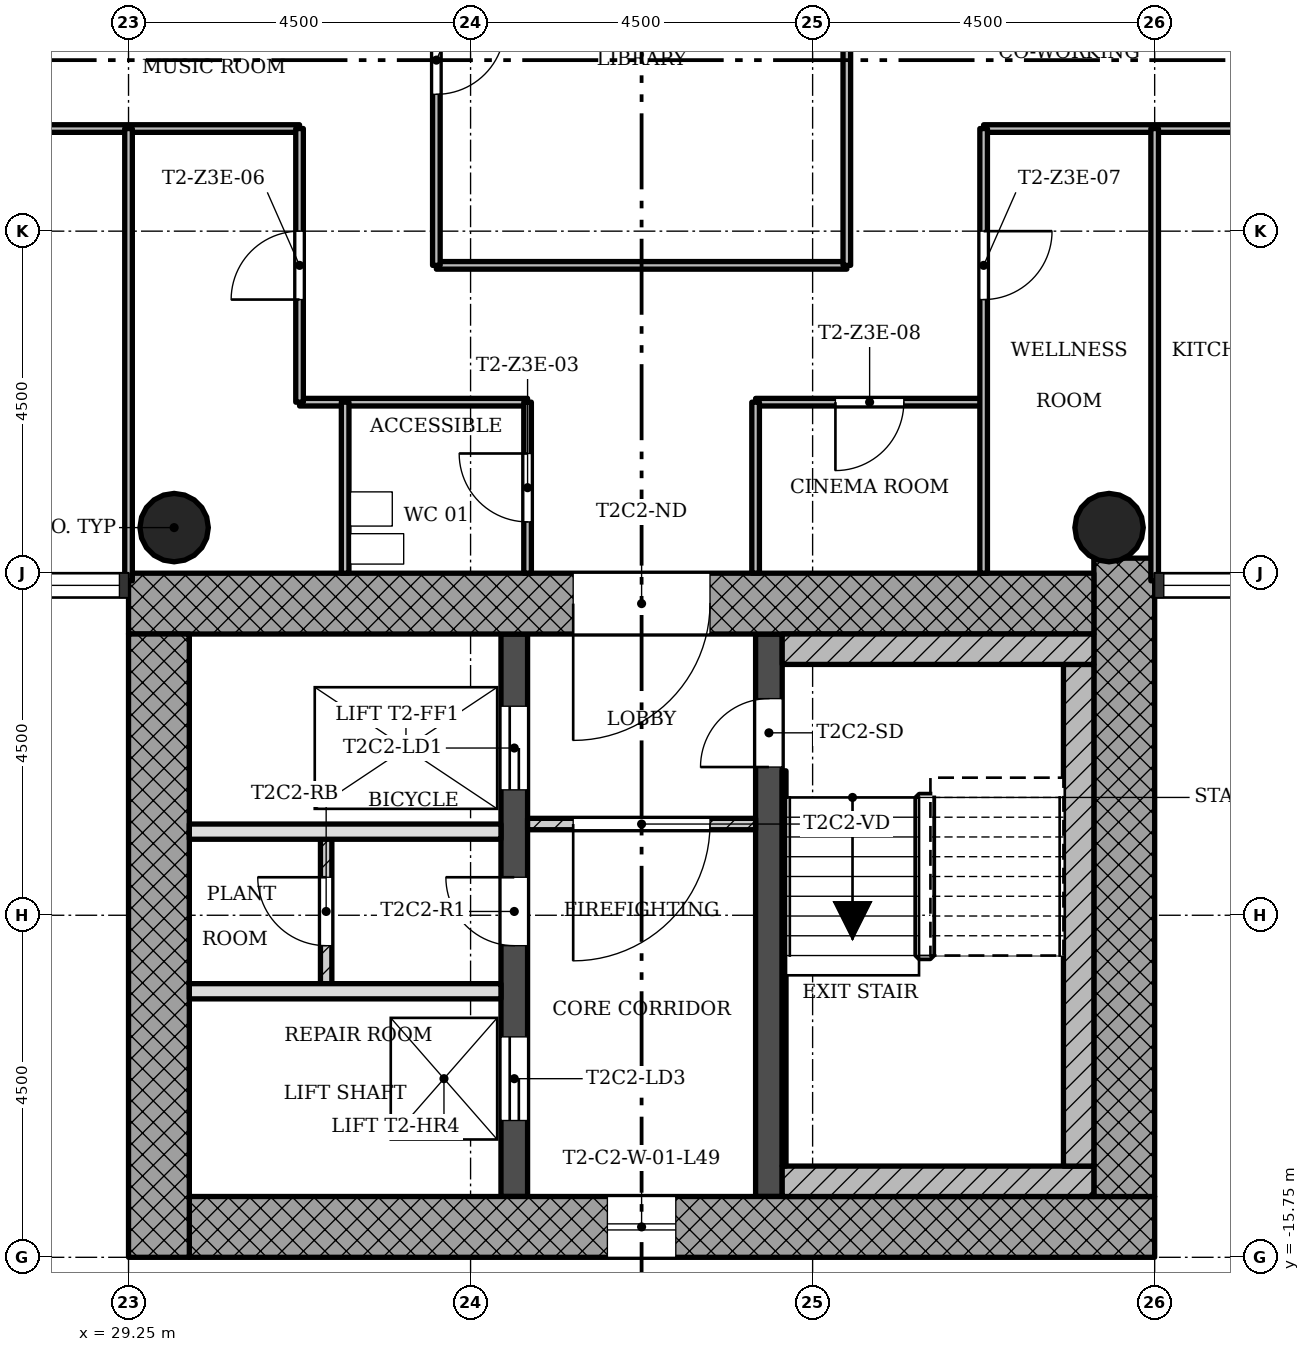
"""IFC4 building model, lengths in metres.
Left out: names, types, materials, properties, quantities, classifications, styles, units other than length and angle.
Written with IfcOpenShell. Run it as: python <this file> out.ifc"""

import sys

from ifc_helpers import new_model, si_unit, direction, frame, frame_2d, origin, origin_2d, place, context, subcontext, project, spatial, rectangle, hollow_circle, extrude, element, fill, save


model = new_model("IFC4")
c1 = context("Model", 3, precision=1e-05, world=origin(), true_north=direction((0.0, 1.0)))
c2 = subcontext(c1, "Body", "Model", "MODEL_VIEW")
j1 = project(units=[si_unit("LENGTHUNIT", "METRE"), si_unit("PLANEANGLEUNIT", "RADIAN")], contexts=[c1])
p1 = place(None, origin())
s1 = spatial("IfcSite", under=j1, at=p1, CompositionType="ELEMENT")
p2 = place(p1, origin())
s2 = spatial("IfcBuilding", under=s1, at=p2, CompositionType="ELEMENT")
p3 = place(p2, frame((0.0, 0.0, 177.9)))
s3 = spatial("IfcBuildingStorey", under=s2, at=p3, CompositionType="ELEMENT", Elevation=177.9)
p4 = place(p3, frame((30.05, -15.35, 0.0), z_axis=(0.0, 0.0, 1.0), x_axis=(1.0, 0.0, 0.0)))
e1 = element("IfcWall", 1, at=p4, inside=s3, PredefinedType="SHEAR", context=c2, shape_type="SweptSolid", body=[
    extrude(rectangle(XDim=12.7, YDim=0.8, at=frame_2d((6.35, 0.0))), origin(), (0.0, 0.0, 1.0), 3.4),
])
p5 = place(p4, frame((5.5, 0.0, 0.45)))
e2 = element("IfcOpeningElement", 2, at=p5, cuts=e1, PredefinedType="OPENING", context=c2, shape_type="SweptSolid", body=[
    extrude(rectangle(XDim=0.9, YDim=2.4, at=frame_2d((0.45, 1.2))), frame((0.0, 0.41, 0.0), z_axis=(0.0, -1.0, 0.0), x_axis=(1.0, 0.0, 0.0)), (0.0, 0.0, 1.0), 0.82),
])
p6 = place(p3, frame((42.35, -14.95, 0.0), z_axis=(0.0, 0.0, 1.0), x_axis=(0.0, 1.0, 0.0)))
e3 = element("IfcWall", 3, at=p6, inside=s3, PredefinedType="SHEAR", context=c2, shape_type="SweptSolid", body=[
    extrude(rectangle(XDim=8.398, YDim=0.8, at=frame_2d((4.199, 0.0))), origin(), (0.0, 0.0, 1.0), 3.4),
])
p7 = place(p3, frame((41.95, -7.15, 0.0), z_axis=(0.0, 0.0, 1.0), x_axis=(-1.0, 0.0, 0.0)))
e4 = element("IfcWall", 4, at=p7, inside=s3, PredefinedType="SHEAR", context=c2, shape_type="SweptSolid", body=[
    extrude(rectangle(XDim=12.7, YDim=0.8, at=frame_2d((6.35, 0.0))), origin(), (0.0, 0.0, 1.0), 3.4),
])
p8 = place(p7, frame((5.05, 0.0, 0.0)))
e5 = element("IfcOpeningElement", 5, at=p8, cuts=e4, PredefinedType="OPENING", context=c2, shape_type="SweptSolid", body=[
    extrude(rectangle(XDim=1.8, YDim=2.1, at=frame_2d((0.9, 1.05))), frame((0.0, 0.41, 0.0), z_axis=(0.0, -1.0, 0.0), x_axis=(1.0, 0.0, 0.0)), (0.0, 0.0, 1.0), 0.82),
])
p9 = place(p3, frame((29.65, -7.55, 0.0), z_axis=(0.0, 0.0, 1.0), x_axis=(0.0, -1.0, 0.0)))
e6 = element("IfcWall", 6, at=p9, inside=s3, PredefinedType="SHEAR", context=c2, shape_type="SweptSolid", body=[
    extrude(rectangle(XDim=8.2, YDim=0.8, at=frame_2d((4.1, 0.0))), origin(), (0.0, 0.0, 1.0), 3.4),
])
p10 = place(p3, frame((34.325, -14.95, 0.0), z_axis=(0.0, 0.0, 1.0), x_axis=(0.0, 1.0, 0.0)))
e7 = element("IfcWall", 7, at=p10, inside=s3, PredefinedType="SHEAR", context=c2, shape_type="SweptSolid", body=[
    extrude(rectangle(XDim=7.4, YDim=0.35, at=frame_2d((3.7, 0.0))), origin(), (0.0, 0.0, 1.0), 3.4),
])
p11 = place(p10, frame((5.35, 0.0, 0.0)))
e8 = element("IfcOpeningElement", 8, at=p11, cuts=e7, PredefinedType="OPENING", context=c2, shape_type="SweptSolid", body=[
    extrude(rectangle(XDim=1.1, YDim=2.1, at=frame_2d((0.55, 1.05))), frame((0.0, 0.185, 0.0), z_axis=(0.0, -1.0, 0.0), x_axis=(1.0, 0.0, 0.0)), (0.0, 0.0, 1.0), 0.37),
])
p12 = place(p10, frame((1.0, 0.0, 0.0)))
e9 = element("IfcOpeningElement", 9, at=p12, cuts=e7, PredefinedType="OPENING", context=c2, shape_type="SweptSolid", body=[
    extrude(rectangle(XDim=1.1, YDim=2.1, at=frame_2d((0.55, 1.05))), frame((0.0, 0.185, 0.0), z_axis=(0.0, -1.0, 0.0), x_axis=(1.0, 0.0, 0.0)), (0.0, 0.0, 1.0), 0.37),
])
p13 = place(p10, frame((3.3, 0.0, 0.0)))
e10 = element("IfcOpeningElement", 10, at=p13, cuts=e7, PredefinedType="OPENING", context=c2, shape_type="SweptSolid", body=[
    extrude(rectangle(XDim=0.9, YDim=2.1, at=frame_2d((0.45, 1.05))), frame((0.0, 0.185, 0.0), z_axis=(0.0, -1.0, 0.0), x_axis=(1.0, 0.0, 0.0)), (0.0, 0.0, 1.0), 0.37),
])
p14 = place(p3, frame((37.675, -14.95, 0.0), z_axis=(0.0, 0.0, 1.0), x_axis=(0.0, 1.0, 0.0)))
e11 = element("IfcWall", 11, at=p14, inside=s3, PredefinedType="SHEAR", context=c2, shape_type="SweptSolid", body=[
    extrude(rectangle(XDim=7.4, YDim=0.35, at=frame_2d((3.7, 0.0))), origin(), (0.0, 0.0, 1.0), 3.4),
])
p15 = place(p14, frame((5.65, 0.0, 0.0)))
e12 = element("IfcOpeningElement", 12, at=p15, cuts=e11, PredefinedType="OPENING", context=c2, shape_type="SweptSolid", body=[
    extrude(rectangle(XDim=0.9, YDim=2.1, at=frame_2d((0.45, 1.05))), frame((0.0, 0.185, 0.0), z_axis=(0.0, -1.0, 0.0), x_axis=(1.0, 0.0, 0.0)), (0.0, 0.0, 1.0), 0.37),
])
for number, where, z_axis, x_axis in (
    (13, (42.15, -6.15, 0.0), (0.0, 0.0, 1.0), (1.0, 0.0, 0.0)),
    (14, (29.85, -6.15, 0.0), (0.0, 0.0, 1.0), (1.0, 0.0, 0.0)),
):
    element("IfcColumn", number, at=place(p3, frame(where, z_axis=z_axis, x_axis=x_axis)), inside=s3, PredefinedType="COLUMN", context=c2, shape_type="SweptSolid", body=[
        extrude(hollow_circle(Radius=0.45, WallThickness=0.032, at=origin_2d()), origin(), (0.0, 0.0, 1.0), 3.4),
    ])
p16 = place(p3, frame((34.5, -10.05, 0.0), z_axis=(0.0, 0.0, 1.0), x_axis=(1.0, 0.0, 0.0)))
e15 = element("IfcWall", 15, at=p16, inside=s3, PredefinedType="PARTITIONING", context=c2, shape_type="SweptSolid", body=[
    extrude(rectangle(XDim=3.0, YDim=0.15, at=frame_2d((1.5, 0.0))), origin(), (0.0, 0.0, 1.0), 3.0),
])
p17 = place(p16, frame((0.6, 0.0, 0.0)))
e16 = element("IfcOpeningElement", 16, at=p17, cuts=e15, PredefinedType="OPENING", context=c2, shape_type="SweptSolid", body=[
    extrude(rectangle(XDim=1.8, YDim=2.1, at=frame_2d((0.9, 1.05))), frame((0.0, 0.085, 0.0), z_axis=(0.0, -1.0, 0.0), x_axis=(1.0, 0.0, 0.0)), (0.0, 0.0, 1.0), 0.17),
])
for number, where, z_axis, x_axis in (
    (17, (30.05, -12.25, 0.0), (0.0, 0.0, 1.0), (1.0, 0.0, 0.0)),
    (18, (30.05, -10.15, 0.0), (0.0, 0.0, 1.0), (1.0, 0.0, 0.0)),
):
    element("IfcWall", number, at=place(p3, frame(where, z_axis=z_axis, x_axis=x_axis)), inside=s3, PredefinedType="SOLIDWALL", context=c2, shape_type="SweptSolid", body=[
        extrude(rectangle(XDim=4.1, YDim=0.2, at=frame_2d((2.05, 0.0))), origin(), (0.0, 0.0, 1.0), 3.0),
    ])
p18 = place(p3, frame((31.85, -10.15, 0.0), z_axis=(0.0, 0.0, 1.0), x_axis=(0.0, -1.0, 0.0)))
e19 = element("IfcWall", 19, at=p18, inside=s3, PredefinedType="PARTITIONING", context=c2, shape_type="SweptSolid", body=[
    extrude(rectangle(XDim=2.1, YDim=0.15, at=frame_2d((1.05, 0.0))), origin(), (0.0, 0.0, 1.0), 3.0),
])
p19 = place(p18, frame((0.6, 0.0, 0.0)))
e20 = element("IfcOpeningElement", 20, at=p19, cuts=e19, PredefinedType="OPENING", context=c2, shape_type="SweptSolid", body=[
    extrude(rectangle(XDim=0.9, YDim=2.1, at=frame_2d((0.45, 1.05))), frame((0.0, 0.085, 0.0), z_axis=(0.0, -1.0, 0.0), x_axis=(1.0, 0.0, 0.0)), (0.0, 0.0, 1.0), 0.17),
])
p20 = place(p3, frame((40.5, -4.5, 0.0), z_axis=(0.0, 0.0, 1.0), x_axis=(-1.0, 0.0, 0.0)))
e21 = element("IfcWall", 21, at=p20, inside=s3, PredefinedType="PARTITIONING", context=c2, shape_type="SweptSolid", body=[
    extrude(rectangle(XDim=3.0, YDim=0.1, at=frame_2d((1.5, 0.0))), origin(), (0.0, 0.0, 1.0), 3.0),
])
p21 = place(p20, frame((1.05, 0.0, 0.0)))
e22 = element("IfcOpeningElement", 22, at=p21, cuts=e21, PredefinedType="OPENING", context=c2, shape_type="SweptSolid", body=[
    extrude(rectangle(XDim=0.9, YDim=2.1, at=frame_2d((0.45, 1.05))), frame((0.0, 0.06, 0.0), z_axis=(0.0, -1.0, 0.0), x_axis=(1.0, 0.0, 0.0)), (0.0, 0.0, 1.0), 0.12),
])
p22 = place(p3, frame((34.5, -4.5, 0.0), z_axis=(0.0, 0.0, 1.0), x_axis=(-1.0, 0.0, 0.0)))
e23 = element("IfcWall", 23, at=p22, inside=s3, PredefinedType="PARTITIONING", context=c2, shape_type="SweptSolid", body=[
    extrude(rectangle(XDim=3.0, YDim=0.1, at=frame_2d((1.5, 0.0))), origin(), (0.0, 0.0, 1.0), 3.0),
])
p23 = place(p3, frame((38.7, -2.7, 0.0), z_axis=(0.0, 0.0, 1.0), x_axis=(-1.0, 0.0, 0.0)))
e24 = element("IfcWall", 24, at=p23, inside=s3, PredefinedType="PARTITIONING", context=c2, shape_type="SweptSolid", body=[
    extrude(rectangle(XDim=5.4, YDim=0.1, at=frame_2d((2.7, 0.0))), origin(), (0.0, 0.0, 1.0), 3.0),
])
p24 = place(p3, frame((44.55, -0.9, 0.0), z_axis=(0.0, 0.0, 1.0), x_axis=(-1.0, 0.0, 0.0)))
e25 = element("IfcWall", 25, at=p24, inside=s3, PredefinedType="PARTITIONING", context=c2, shape_type="SweptSolid", body=[
    extrude(rectangle(XDim=4.05, YDim=0.1, at=frame_2d((2.025, 0.0))), origin(), (0.0, 0.0, 1.0), 3.0),
])
p25 = place(p3, frame((31.5, -0.9, 0.0), z_axis=(0.0, 0.0, 1.0), x_axis=(-1.0, 0.0, 0.0)))
e26 = element("IfcWall", 26, at=p25, inside=s3, PredefinedType="PARTITIONING", context=c2, shape_type="SweptSolid", body=[
    extrude(rectangle(XDim=6.75, YDim=0.1, at=frame_2d((3.375, 0.0))), origin(), (0.0, 0.0, 1.0), 3.0),
])
p26 = place(p25, frame((4.05, 0.0, 0.0)))
e27 = element("IfcOpeningElement", 27, at=p26, cuts=e26, PredefinedType="OPENING", context=c2, shape_type="SweptSolid", body=[
    extrude(rectangle(XDim=0.9, YDim=2.1, at=frame_2d((0.45, 1.05))), frame((0.0, 0.06, 0.0), z_axis=(0.0, -1.0, 0.0), x_axis=(1.0, 0.0, 0.0)), (0.0, 0.0, 1.0), 0.12),
])
p27 = place(p3, frame((42.75, -6.85, 0.0), z_axis=(0.0, 0.0, 1.0), x_axis=(0.0, 1.0, 0.0)))
e28 = element("IfcWall", 28, at=p27, inside=s3, PredefinedType="PARTITIONING", context=c2, shape_type="SweptSolid", body=[
    extrude(rectangle(XDim=5.95, YDim=0.1, at=frame_2d((2.975, 0.0))), origin(), (0.0, 0.0, 1.0), 3.0),
])
p28 = place(p3, frame((40.5, -6.75, 0.0), z_axis=(0.0, 0.0, 1.0), x_axis=(0.0, 1.0, 0.0)))
e29 = element("IfcWall", 29, at=p28, inside=s3, PredefinedType="PARTITIONING", context=c2, shape_type="SweptSolid", body=[
    extrude(rectangle(XDim=5.85, YDim=0.1, at=frame_2d((2.925, 0.0))), origin(), (0.0, 0.0, 1.0), 3.0),
])
p29 = place(p28, frame((3.6, 0.0, 0.0)))
e30 = element("IfcOpeningElement", 30, at=p29, cuts=e29, PredefinedType="OPENING", context=c2, shape_type="SweptSolid", body=[
    extrude(rectangle(XDim=0.9, YDim=2.1, at=frame_2d((0.45, 1.05))), frame((0.0, 0.06, 0.0), z_axis=(0.0, -1.0, 0.0), x_axis=(1.0, 0.0, 0.0)), (0.0, 0.0, 1.0), 0.12),
])
p30 = place(p3, frame((38.7, -2.7, 0.0), z_axis=(0.0, 0.0, 1.0), x_axis=(0.0, 1.0, 0.0)))
e31 = element("IfcWall", 31, at=p30, inside=s3, PredefinedType="PARTITIONING", context=c2, shape_type="SweptSolid", body=[
    extrude(rectangle(XDim=5.4, YDim=0.1, at=frame_2d((2.7, 0.0))), origin(), (0.0, 0.0, 1.0), 3.0),
])
p31 = place(p3, frame((37.5, -6.75, 0.0), z_axis=(0.0, 0.0, 1.0), x_axis=(0.0, 1.0, 0.0)))
e32 = element("IfcWall", 32, at=p31, inside=s3, PredefinedType="PARTITIONING", context=c2, shape_type="SweptSolid", body=[
    extrude(rectangle(XDim=2.25, YDim=0.1, at=frame_2d((1.125, 0.0))), origin(), (0.0, 0.0, 1.0), 3.0),
])
p32 = place(p3, frame((34.5, -6.75, 0.0), z_axis=(0.0, 0.0, 1.0), x_axis=(0.0, 1.0, 0.0)))
e33 = element("IfcWall", 33, at=p32, inside=s3, PredefinedType="PARTITIONING", context=c2, shape_type="SweptSolid", body=[
    extrude(rectangle(XDim=2.25, YDim=0.1, at=frame_2d((1.125, 0.0))), origin(), (0.0, 0.0, 1.0), 3.0),
])
p33 = place(p32, frame((0.675, 0.0, 0.0)))
e34 = element("IfcOpeningElement", 34, at=p33, cuts=e33, PredefinedType="OPENING", context=c2, shape_type="SweptSolid", body=[
    extrude(rectangle(XDim=0.9, YDim=2.1, at=frame_2d((0.45, 1.05))), frame((0.0, 0.06, 0.0), z_axis=(0.0, -1.0, 0.0), x_axis=(1.0, 0.0, 0.0)), (0.0, 0.0, 1.0), 0.12),
])
p34 = place(p3, frame((33.3, -2.7, 0.0), z_axis=(0.0, 0.0, 1.0), x_axis=(0.0, 1.0, 0.0)))
e35 = element("IfcWall", 35, at=p34, inside=s3, PredefinedType="PARTITIONING", context=c2, shape_type="SweptSolid", body=[
    extrude(rectangle(XDim=5.4, YDim=0.1, at=frame_2d((2.7, 0.0))), origin(), (0.0, 0.0, 1.0), 3.0),
])
p35 = place(p34, frame((2.25, 0.0, 0.0)))
e36 = element("IfcOpeningElement", 36, at=p35, cuts=e35, PredefinedType="OPENING", context=c2, shape_type="SweptSolid", body=[
    extrude(rectangle(XDim=0.9, YDim=2.1, at=frame_2d((0.45, 1.05))), frame((0.0, 0.06, 0.0), z_axis=(0.0, -1.0, 0.0), x_axis=(1.0, 0.0, 0.0)), (0.0, 0.0, 1.0), 0.12),
])
p36 = place(p3, frame((32.1, -6.75, 0.0), z_axis=(0.0, 0.0, 1.0), x_axis=(0.0, 1.0, 0.0)))
e37 = element("IfcWall", 37, at=p36, inside=s3, PredefinedType="PARTITIONING", context=c2, shape_type="SweptSolid", body=[
    extrude(rectangle(XDim=2.25, YDim=0.1, at=frame_2d((1.125, 0.0))), origin(), (0.0, 0.0, 1.0), 3.0),
])
p37 = place(p3, frame((31.5, -4.5, 0.0), z_axis=(0.0, 0.0, 1.0), x_axis=(0.0, 1.0, 0.0)))
e38 = element("IfcWall", 38, at=p37, inside=s3, PredefinedType="PARTITIONING", context=c2, shape_type="SweptSolid", body=[
    extrude(rectangle(XDim=3.6, YDim=0.1, at=frame_2d((1.8, 0.0))), origin(), (0.0, 0.0, 1.0), 3.0),
])
p38 = place(p37, frame((1.35, 0.0, 0.0)))
e39 = element("IfcOpeningElement", 39, at=p38, cuts=e38, PredefinedType="OPENING", context=c2, shape_type="SweptSolid", body=[
    extrude(rectangle(XDim=0.9, YDim=2.1, at=frame_2d((0.45, 1.05))), frame((0.0, 0.06, 0.0), z_axis=(0.0, -1.0, 0.0), x_axis=(1.0, 0.0, 0.0)), (0.0, 0.0, 1.0), 0.12),
])
p39 = place(p3, frame((29.25, -6.85, 0.0), z_axis=(0.0, 0.0, 1.0), x_axis=(0.0, 1.0, 0.0)))
e40 = element("IfcWall", 40, at=p39, inside=s3, PredefinedType="PARTITIONING", context=c2, shape_type="SweptSolid", body=[
    extrude(rectangle(XDim=5.95, YDim=0.1, at=frame_2d((2.975, 0.0))), origin(), (0.0, 0.0, 1.0), 3.0),
])
p40 = place(p3, frame((37.85, -14.75, 0.0), z_axis=(0.0, 0.0, 1.0), x_axis=(1.0, 0.0, 0.0)))
e41 = element("IfcWall", 41, at=p40, inside=s3, PredefinedType="SHEAR", context=c2, shape_type="SweptSolid", body=[
    extrude(rectangle(XDim=4.1, YDim=0.4, at=frame_2d((2.05, 0.0))), origin(), (0.0, 0.0, 1.0), 3.4),
])
p41 = place(p3, frame((41.75, -7.95, 0.0), z_axis=(0.0, 0.0, 1.0), x_axis=(0.0, -1.0, 0.0)))
e42 = element("IfcWall", 42, at=p41, inside=s3, PredefinedType="SHEAR", context=c2, shape_type="SweptSolid", body=[
    extrude(rectangle(XDim=6.6, YDim=0.4, at=frame_2d((3.3, 0.0))), origin(), (0.0, 0.0, 1.0), 3.4),
])
p42 = place(p3, frame((37.85, -7.75, 0.0), z_axis=(0.0, 0.0, 1.0), x_axis=(1.0, 0.0, 0.0)))
e43 = element("IfcWall", 43, at=p42, inside=s3, PredefinedType="SHEAR", context=c2, shape_type="SweptSolid", body=[
    extrude(rectangle(XDim=4.1, YDim=0.4, at=frame_2d((2.05, 0.0))), origin(), (0.0, 0.0, 1.0), 3.4),
])
p43 = place(p3, frame((37.875, -9.35, 0.0), z_axis=(0.0, 0.0, 1.0), x_axis=(0.0, -1.0, 0.0)))
e44 = element("IfcWall", 44, at=p43, inside=s3, PredefinedType="SHEAR", context=c2, shape_type="SweptSolid", body=[
    extrude(rectangle(XDim=5.2, YDim=0.05, at=frame_2d((2.6, 0.0))), origin(), (0.0, 0.0, 1.0), 3.4),
])
p44 = place(p5, origin())
e45 = element("IfcWindow", 45, at=p44, inside=s3, PartitioningType="SINGLE_PANEL", PredefinedType="WINDOW", context=c2, shape_type="SweptSolid", body=[
    extrude(rectangle(XDim=0.9, YDim=2.4, at=frame_2d((0.45, 1.2))), frame((0.0, 0.03, 0.0), z_axis=(0.0, -1.0, 0.0), x_axis=(1.0, 0.0, 0.0)), (0.0, 0.0, 1.0), 0.06),
])
fill(e2, e45)
p45 = place(p17, origin())
e46 = element("IfcDoor", 46, at=p45, inside=s3, OperationType="SINGLE_SWING_LEFT", PredefinedType="DOOR", context=c2, shape_type="SweptSolid", body=[
    extrude(rectangle(XDim=1.8, YDim=2.1, at=frame_2d((0.9, 1.05))), frame((0.0, 0.025, 0.0), z_axis=(0.0, -1.0, 0.0), x_axis=(1.0, 0.0, 0.0)), (0.0, 0.0, 1.0), 0.05),
])
fill(e16, e46)
p46 = place(p19, origin())
e47 = element("IfcDoor", 47, at=p46, inside=s3, OperationType="SINGLE_SWING_LEFT", PredefinedType="DOOR", context=c2, shape_type="SweptSolid", body=[
    extrude(rectangle(XDim=0.9, YDim=2.1, at=frame_2d((0.45, 1.05))), frame((0.0, 0.025, 0.0), z_axis=(0.0, -1.0, 0.0), x_axis=(1.0, 0.0, 0.0)), (0.0, 0.0, 1.0), 0.05),
])
fill(e20, e47)
p47 = place(p35, origin())
e48 = element("IfcDoor", 48, at=p47, inside=s3, OperationType="SINGLE_SWING_RIGHT", PredefinedType="DOOR", context=c2, shape_type="SweptSolid", body=[
    extrude(rectangle(XDim=0.9, YDim=2.1, at=frame_2d((0.45, 1.05))), frame((0.0, 0.025, 0.0), z_axis=(0.0, -1.0, 0.0), x_axis=(1.0, 0.0, 0.0)), (0.0, 0.0, 1.0), 0.05),
])
fill(e36, e48)
p48 = place(p33, origin())
e49 = element("IfcDoor", 49, at=p48, inside=s3, OperationType="SINGLE_SWING_LEFT", PredefinedType="DOOR", context=c2, shape_type="SweptSolid", body=[
    extrude(rectangle(XDim=0.9, YDim=2.1, at=frame_2d((0.45, 1.05))), frame((0.0, 0.025, 0.0), z_axis=(0.0, -1.0, 0.0), x_axis=(1.0, 0.0, 0.0)), (0.0, 0.0, 1.0), 0.05),
])
fill(e34, e49)
p49 = place(p38, origin())
e50 = element("IfcDoor", 50, at=p49, inside=s3, OperationType="SINGLE_SWING_RIGHT", PredefinedType="DOOR", context=c2, shape_type="SweptSolid", body=[
    extrude(rectangle(XDim=0.9, YDim=2.1, at=frame_2d((0.45, 1.05))), frame((0.0, 0.025, 0.0), z_axis=(0.0, -1.0, 0.0), x_axis=(1.0, 0.0, 0.0)), (0.0, 0.0, 1.0), 0.05),
])
fill(e39, e50)
p50 = place(p29, origin())
e51 = element("IfcDoor", 51, at=p50, inside=s3, OperationType="SINGLE_SWING_RIGHT", PredefinedType="DOOR", context=c2, shape_type="SweptSolid", body=[
    extrude(rectangle(XDim=0.9, YDim=2.1, at=frame_2d((0.45, 1.05))), frame((0.0, 0.025, 0.0), z_axis=(0.0, -1.0, 0.0), x_axis=(1.0, 0.0, 0.0)), (0.0, 0.0, 1.0), 0.05),
])
fill(e30, e51)
p51 = place(p21, origin())
e52 = element("IfcDoor", 52, at=p51, inside=s3, OperationType="SINGLE_SWING_LEFT", PredefinedType="DOOR", context=c2, shape_type="SweptSolid", body=[
    extrude(rectangle(XDim=0.9, YDim=2.1, at=frame_2d((0.45, 1.05))), frame((0.0, 0.025, 0.0), z_axis=(0.0, -1.0, 0.0), x_axis=(1.0, 0.0, 0.0)), (0.0, 0.0, 1.0), 0.05),
])
fill(e22, e52)
p52 = place(p15, origin())
e53 = element("IfcDoor", 53, at=p52, inside=s3, OperationType="SINGLE_SWING_RIGHT", PredefinedType="DOOR", context=c2, shape_type="SweptSolid", body=[
    extrude(rectangle(XDim=0.9, YDim=2.1, at=frame_2d((0.45, 1.05))), frame((0.0, 0.025, 0.0), z_axis=(0.0, -1.0, 0.0), x_axis=(1.0, 0.0, 0.0)), (0.0, 0.0, 1.0), 0.05),
])
fill(e12, e53)
p53 = place(p11, origin())
e54 = element("IfcDoor", 54, at=p53, inside=s3, OperationType="SLIDING_TO_LEFT", PredefinedType="DOOR", context=c2, shape_type="SweptSolid", body=[
    extrude(rectangle(XDim=1.1, YDim=2.1, at=frame_2d((0.55, 1.05))), frame((0.0, 0.025, 0.0), z_axis=(0.0, -1.0, 0.0), x_axis=(1.0, 0.0, 0.0)), (0.0, 0.0, 1.0), 0.05),
])
fill(e8, e54)
p54 = place(p12, origin())
e55 = element("IfcDoor", 55, at=p54, inside=s3, OperationType="SLIDING_TO_LEFT", PredefinedType="DOOR", context=c2, shape_type="SweptSolid", body=[
    extrude(rectangle(XDim=1.1, YDim=2.1, at=frame_2d((0.55, 1.05))), frame((0.0, 0.025, 0.0), z_axis=(0.0, -1.0, 0.0), x_axis=(1.0, 0.0, 0.0)), (0.0, 0.0, 1.0), 0.05),
])
fill(e9, e55)
p55 = place(p13, origin())
e56 = element("IfcDoor", 56, at=p55, inside=s3, OperationType="SINGLE_SWING_LEFT", PredefinedType="DOOR", context=c2, shape_type="SweptSolid", body=[
    extrude(rectangle(XDim=0.9, YDim=2.1, at=frame_2d((0.45, 1.05))), frame((0.0, 0.025, 0.0), z_axis=(0.0, -1.0, 0.0), x_axis=(1.0, 0.0, 0.0)), (0.0, 0.0, 1.0), 0.05),
])
fill(e10, e56)
p56 = place(p8, origin())
e57 = element("IfcDoor", 57, at=p56, inside=s3, OperationType="SINGLE_SWING_LEFT", PredefinedType="DOOR", context=c2, shape_type="SweptSolid", body=[
    extrude(rectangle(XDim=1.8, YDim=2.1, at=frame_2d((0.9, 1.05))), frame((0.0, 0.025, 0.0), z_axis=(0.0, -1.0, 0.0), x_axis=(1.0, 0.0, 0.0)), (0.0, 0.0, 1.0), 0.05),
])
fill(e5, e57)
save(model, sys.argv[1])
